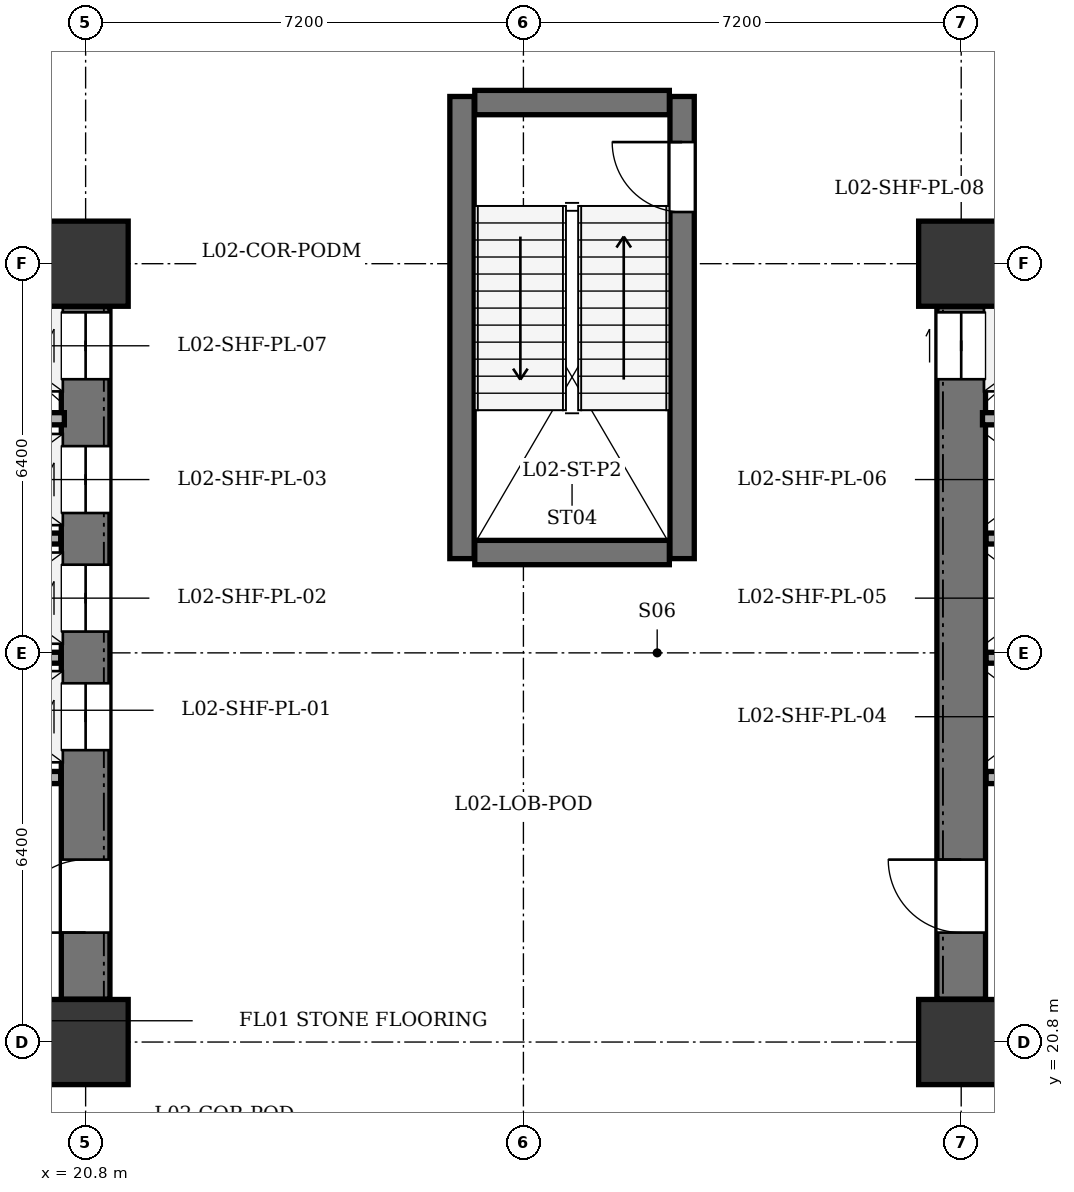
"""IFC4 building model, lengths in metres.
Left out: names, types, materials, properties, quantities, classifications, styles, units other than length and angle.
Written with IfcOpenShell. Run it as: python <this file> out.ifc"""

import sys

from ifc_helpers import new_model, si_unit, direction, frame, frame_2d, origin, origin_2d, place, context, subcontext, project, spatial, rectangle, extrude, element, fill, save


model = new_model("IFC4")
c1 = context("Model", 3, precision=1e-05, world=origin(), true_north=direction((0.0, 1.0)))
c2 = subcontext(c1, "Body", "Model", "MODEL_VIEW")
j1 = project(units=[si_unit("LENGTHUNIT", "METRE"), si_unit("PLANEANGLEUNIT", "RADIAN")], contexts=[c1])
p1 = place(None, origin())
s1 = spatial("IfcSite", under=j1, at=p1, CompositionType="ELEMENT")
p2 = place(p1, origin())
s2 = spatial("IfcBuilding", under=s1, at=p2, CompositionType="ELEMENT")
p3 = place(p2, frame((0.0, 0.0, 9.9)))
s3 = spatial("IfcBuildingStorey", under=s2, at=p3, CompositionType="ELEMENT", Elevation=9.9)
for number, where, z_axis, x_axis in (
    (1, (20.8, 20.8, 0.0), (0.0, 0.0, 1.0), (1.0, 0.0, 0.0)),
    (2, (20.8, 33.6, 0.0), (0.0, 0.0, 1.0), (1.0, 0.0, 0.0)),
    (3, (35.2, 20.8, 0.0), (0.0, 0.0, 1.0), (1.0, 0.0, 0.0)),
    (4, (35.2, 33.6, 0.0), (0.0, 0.0, 1.0), (1.0, 0.0, 0.0)),
):
    element("IfcColumn", number, at=place(p3, frame(where, z_axis=z_axis, x_axis=x_axis)), inside=s3, PredefinedType="COLUMN", context=c2, shape_type="SweptSolid", body=[
        extrude(rectangle(XDim=1.4, YDim=1.4, at=origin_2d()), origin(), (0.0, 0.0, 1.0), 4.5),
    ])
p4 = place(p3, frame((20.8, 21.505, 0.0), z_axis=(0.0, 0.0, 1.0), x_axis=(0.0, 1.0, 0.0)))
e5 = element("IfcWall", 5, at=p4, inside=s3, PredefinedType="SHEAR", context=c2, shape_type="SweptSolid", body=[
    extrude(rectangle(XDim=11.39, YDim=0.8, at=frame_2d((5.695, 0.0))), origin(), (0.0, 0.0, 1.0), 4.18),
])
p5 = place(p4, frame((1.095, 0.0, 0.0)))
e6 = element("IfcOpeningElement", 6, at=p5, cuts=e5, PredefinedType="OPENING", context=c2, shape_type="SweptSolid", body=[
    extrude(rectangle(XDim=1.2, YDim=2.15, at=frame_2d((0.6, 1.075))), frame((0.0, 0.41, 0.0), z_axis=(0.0, -1.0, 0.0), x_axis=(1.0, 0.0, 0.0)), (0.0, 0.0, 1.0), 0.82),
])
p6 = place(p4, frame((4.095, 0.0, 0.0)))
e7 = element("IfcOpeningElement", 7, at=p6, cuts=e5, PredefinedType="OPENING", context=c2, shape_type="SweptSolid", body=[
    extrude(rectangle(XDim=1.1, YDim=2.1, at=frame_2d((0.55, 1.05))), frame((0.0, 0.41, 0.0), z_axis=(0.0, -1.0, 0.0), x_axis=(1.0, 0.0, 0.0)), (0.0, 0.0, 1.0), 0.82),
])
p7 = place(p4, frame((6.045, 0.0, 0.0)))
e8 = element("IfcOpeningElement", 8, at=p7, cuts=e5, PredefinedType="OPENING", context=c2, shape_type="SweptSolid", body=[
    extrude(rectangle(XDim=1.1, YDim=2.1, at=frame_2d((0.55, 1.05))), frame((0.0, 0.41, 0.0), z_axis=(0.0, -1.0, 0.0), x_axis=(1.0, 0.0, 0.0)), (0.0, 0.0, 1.0), 0.82),
])
p8 = place(p4, frame((7.995, 0.0, 0.0)))
e9 = element("IfcOpeningElement", 9, at=p8, cuts=e5, PredefinedType="OPENING", context=c2, shape_type="SweptSolid", body=[
    extrude(rectangle(XDim=1.1, YDim=2.1, at=frame_2d((0.55, 1.05))), frame((0.0, 0.41, 0.0), z_axis=(0.0, -1.0, 0.0), x_axis=(1.0, 0.0, 0.0)), (0.0, 0.0, 1.0), 0.82),
])
p9 = place(p4, frame((10.195, 0.0, 0.0)))
e10 = element("IfcOpeningElement", 10, at=p9, cuts=e5, PredefinedType="OPENING", context=c2, shape_type="SweptSolid", body=[
    extrude(rectangle(XDim=1.1, YDim=2.1, at=frame_2d((0.55, 1.05))), frame((0.0, 0.41, 0.0), z_axis=(0.0, -1.0, 0.0), x_axis=(1.0, 0.0, 0.0)), (0.0, 0.0, 1.0), 0.82),
])
p10 = place(p3, frame((16.6, 25.15, 0.0), z_axis=(0.0, 0.0, 1.0), x_axis=(1.0, 0.0, 0.0)))
e11 = element("IfcWall", 11, at=p10, inside=s3, PredefinedType="SOLIDWALL", context=c2, shape_type="SweptSolid", body=[
    extrude(rectangle(XDim=3.79, YDim=0.2, at=frame_2d((1.895, 0.0))), origin(), (0.0, 0.0, 1.0), 4.18),
])
p11 = place(p10, frame((0.3, 0.0, 0.0)))
e12 = element("IfcOpeningElement", 12, at=p11, cuts=e11, PredefinedType="OPENING", context=c2, shape_type="SweptSolid", body=[
    extrude(rectangle(XDim=0.85, YDim=2.02, at=frame_2d((0.425, 1.01))), frame((0.0, 0.11, 0.0), z_axis=(0.0, -1.0, 0.0), x_axis=(1.0, 0.0, 0.0)), (0.0, 0.0, 1.0), 0.22),
])
p12 = place(p3, frame((16.6, 31.05, 0.0), z_axis=(0.0, 0.0, 1.0), x_axis=(1.0, 0.0, 0.0)))
e13 = element("IfcWall", 13, at=p12, inside=s3, PredefinedType="SOLIDWALL", context=c2, shape_type="SweptSolid", body=[
    extrude(rectangle(XDim=3.85, YDim=0.2, at=frame_2d((1.925, 0.0))), origin(), (0.0, 0.0, 1.0), 4.18),
])
for number, where, z_axis, x_axis in (
    (14, (18.22, 27.12, 0.0), (0.0, 0.0, 1.0), (1.0, 0.0, 0.0)),
    (15, (18.22, 29.08, 0.0), (0.0, 0.0, 1.0), (1.0, 0.0, 0.0)),
):
    element("IfcWall", number, at=place(p3, frame(where, z_axis=z_axis, x_axis=x_axis)), inside=s3, PredefinedType="PARTITIONING", context=c2, shape_type="SweptSolid", body=[
        extrude(rectangle(XDim=2.17, YDim=0.18, at=frame_2d((1.085, 0.0))), origin(), (0.0, 0.0, 1.0), 4.18),
    ])
p13 = place(p3, frame((35.2, 21.505, 0.0), z_axis=(0.0, 0.0, 1.0), x_axis=(0.0, 1.0, 0.0)))
e16 = element("IfcWall", 16, at=p13, inside=s3, PredefinedType="SHEAR", context=c2, shape_type="SweptSolid", body=[
    extrude(rectangle(XDim=11.39, YDim=0.8, at=frame_2d((5.695, 0.0))), origin(), (0.0, 0.0, 1.0), 4.18),
])
p14 = place(p13, frame((1.095, 0.0, 0.0)))
e17 = element("IfcOpeningElement", 17, at=p14, cuts=e16, PredefinedType="OPENING", context=c2, shape_type="SweptSolid", body=[
    extrude(rectangle(XDim=1.2, YDim=2.15, at=frame_2d((0.6, 1.075))), frame((0.0, 0.41, 0.0), z_axis=(0.0, -1.0, 0.0), x_axis=(1.0, 0.0, 0.0)), (0.0, 0.0, 1.0), 0.82),
])
p15 = place(p13, frame((10.195, 0.0, 0.0)))
e18 = element("IfcOpeningElement", 18, at=p15, cuts=e16, PredefinedType="OPENING", context=c2, shape_type="SweptSolid", body=[
    extrude(rectangle(XDim=1.1, YDim=2.1, at=frame_2d((0.55, 1.05))), frame((0.0, 0.41, 0.0), z_axis=(0.0, -1.0, 0.0), x_axis=(1.0, 0.0, 0.0)), (0.0, 0.0, 1.0), 0.82),
])
p16 = place(p3, frame((35.61, 25.15, 0.0), z_axis=(0.0, 0.0, 1.0), x_axis=(1.0, 0.0, 0.0)))
e19 = element("IfcWall", 19, at=p16, inside=s3, PredefinedType="SOLIDWALL", context=c2, shape_type="SweptSolid", body=[
    extrude(rectangle(XDim=3.79, YDim=0.2, at=frame_2d((1.895, 0.0))), origin(), (0.0, 0.0, 1.0), 4.18),
])
p17 = place(p3, frame((35.55, 31.05, 0.0), z_axis=(0.0, 0.0, 1.0), x_axis=(1.0, 0.0, 0.0)))
e20 = element("IfcWall", 20, at=p17, inside=s3, PredefinedType="SOLIDWALL", context=c2, shape_type="SweptSolid", body=[
    extrude(rectangle(XDim=2.25, YDim=0.2, at=frame_2d((1.125, 0.0))), origin(), (0.0, 0.0, 1.0), 4.18),
])
for number, where, z_axis, x_axis in (
    (21, (35.61, 27.12, 0.0), (0.0, 0.0, 1.0), (1.0, 0.0, 0.0)),
    (22, (35.61, 29.08, 0.0), (0.0, 0.0, 1.0), (1.0, 0.0, 0.0)),
):
    element("IfcWall", number, at=place(p3, frame(where, z_axis=z_axis, x_axis=x_axis)), inside=s3, PredefinedType="PARTITIONING", context=c2, shape_type="SweptSolid", body=[
        extrude(rectangle(XDim=2.17, YDim=0.18, at=frame_2d((1.085, 0.0))), origin(), (0.0, 0.0, 1.0), 4.18),
    ])
p18 = place(p3, frame((26.99, 28.75, 0.0), z_axis=(0.0, 0.0, 1.0), x_axis=(0.0, 1.0, 0.0)))
e23 = element("IfcWall", 23, at=p18, inside=s3, PredefinedType="SHEAR", context=c2, shape_type="SweptSolid", body=[
    extrude(rectangle(XDim=7.6, YDim=0.4, at=frame_2d((3.8, 0.0))), origin(), (0.0, 0.0, 1.0), 4.18),
])
p19 = place(p3, frame((30.61, 28.75, 0.0), z_axis=(0.0, 0.0, 1.0), x_axis=(0.0, 1.0, 0.0)))
e24 = element("IfcWall", 24, at=p19, inside=s3, PredefinedType="SHEAR", context=c2, shape_type="SweptSolid", body=[
    extrude(rectangle(XDim=7.6, YDim=0.4, at=frame_2d((3.8, 0.0))), origin(), (0.0, 0.0, 1.0), 4.18),
])
p20 = place(p19, frame((5.7, 0.0, 0.0)))
e25 = element("IfcOpeningElement", 25, at=p20, cuts=e24, PredefinedType="OPENING", context=c2, shape_type="SweptSolid", body=[
    extrude(rectangle(XDim=1.15, YDim=2.15, at=frame_2d((0.575, 1.075))), frame((0.0, 0.21, 0.0), z_axis=(0.0, -1.0, 0.0), x_axis=(1.0, 0.0, 0.0)), (0.0, 0.0, 1.0), 0.42),
])
for number, where, z_axis, x_axis in (
    (26, (27.2, 28.85, 0.0), (0.0, 0.0, 1.0), (1.0, 0.0, 0.0)),
    (27, (27.2, 36.25, 0.0), (0.0, 0.0, 1.0), (1.0, 0.0, 0.0)),
):
    element("IfcWall", number, at=place(p3, frame(where, z_axis=z_axis, x_axis=x_axis)), inside=s3, PredefinedType="SHEAR", context=c2, shape_type="SweptSolid", body=[
        extrude(rectangle(XDim=3.2, YDim=0.4, at=frame_2d((1.6, 0.0))), origin(), (0.0, 0.0, 1.0), 4.18),
    ])
p21 = place(p5, origin())
e28 = element("IfcDoor", 28, at=p21, inside=s3, OperationType="SINGLE_SWING_LEFT", PredefinedType="DOOR", context=c2, shape_type="SweptSolid", body=[
    extrude(rectangle(XDim=1.2, YDim=2.15, at=frame_2d((0.6, 1.075))), frame((0.0, 0.025, 0.0), z_axis=(0.0, -1.0, 0.0), x_axis=(1.0, 0.0, 0.0)), (0.0, 0.0, 1.0), 0.05),
])
fill(e6, e28)
p22 = place(p6, origin())
e29 = element("IfcDoor", 29, at=p22, inside=s3, OperationType="DOUBLE_DOOR_SLIDING", PredefinedType="DOOR", context=c2, shape_type="SweptSolid", body=[
    extrude(rectangle(XDim=1.1, YDim=2.1, at=frame_2d((0.55, 1.05))), frame((0.0, 0.025, 0.0), z_axis=(0.0, -1.0, 0.0), x_axis=(1.0, 0.0, 0.0)), (0.0, 0.0, 1.0), 0.05),
])
fill(e7, e29)
p23 = place(p7, origin())
e30 = element("IfcDoor", 30, at=p23, inside=s3, OperationType="DOUBLE_DOOR_SLIDING", PredefinedType="DOOR", context=c2, shape_type="SweptSolid", body=[
    extrude(rectangle(XDim=1.1, YDim=2.1, at=frame_2d((0.55, 1.05))), frame((0.0, 0.025, 0.0), z_axis=(0.0, -1.0, 0.0), x_axis=(1.0, 0.0, 0.0)), (0.0, 0.0, 1.0), 0.05),
])
fill(e8, e30)
p24 = place(p8, origin())
e31 = element("IfcDoor", 31, at=p24, inside=s3, OperationType="DOUBLE_DOOR_SLIDING", PredefinedType="DOOR", context=c2, shape_type="SweptSolid", body=[
    extrude(rectangle(XDim=1.1, YDim=2.1, at=frame_2d((0.55, 1.05))), frame((0.0, 0.025, 0.0), z_axis=(0.0, -1.0, 0.0), x_axis=(1.0, 0.0, 0.0)), (0.0, 0.0, 1.0), 0.05),
])
fill(e9, e31)
p25 = place(p9, origin())
e32 = element("IfcDoor", 32, at=p25, inside=s3, OperationType="DOUBLE_DOOR_SLIDING", PredefinedType="DOOR", context=c2, shape_type="SweptSolid", body=[
    extrude(rectangle(XDim=1.1, YDim=2.1, at=frame_2d((0.55, 1.05))), frame((0.0, 0.025, 0.0), z_axis=(0.0, -1.0, 0.0), x_axis=(1.0, 0.0, 0.0)), (0.0, 0.0, 1.0), 0.05),
])
fill(e10, e32)
p26 = place(p14, origin())
e33 = element("IfcDoor", 33, at=p26, inside=s3, OperationType="SINGLE_SWING_RIGHT", PredefinedType="DOOR", context=c2, shape_type="SweptSolid", body=[
    extrude(rectangle(XDim=1.2, YDim=2.15, at=frame_2d((0.6, 1.075))), frame((0.0, 0.025, 0.0), z_axis=(0.0, -1.0, 0.0), x_axis=(1.0, 0.0, 0.0)), (0.0, 0.0, 1.0), 0.05),
])
fill(e17, e33)
p27 = place(p15, origin())
e34 = element("IfcDoor", 34, at=p27, inside=s3, OperationType="DOUBLE_DOOR_SLIDING", PredefinedType="DOOR", context=c2, shape_type="SweptSolid", body=[
    extrude(rectangle(XDim=1.1, YDim=2.1, at=frame_2d((0.55, 1.05))), frame((0.0, 0.025, 0.0), z_axis=(0.0, -1.0, 0.0), x_axis=(1.0, 0.0, 0.0)), (0.0, 0.0, 1.0), 0.05),
])
fill(e18, e34)
p28 = place(p20, origin())
e35 = element("IfcDoor", 35, at=p28, inside=s3, OperationType="SINGLE_SWING_RIGHT", PredefinedType="DOOR", context=c2, shape_type="SweptSolid", body=[
    extrude(rectangle(XDim=1.15, YDim=2.15, at=frame_2d((0.575, 1.075))), frame((0.0, 0.025, 0.0), z_axis=(0.0, -1.0, 0.0), x_axis=(1.0, 0.0, 0.0)), (0.0, 0.0, 1.0), 0.05),
])
fill(e25, e35)
save(model, sys.argv[1])
